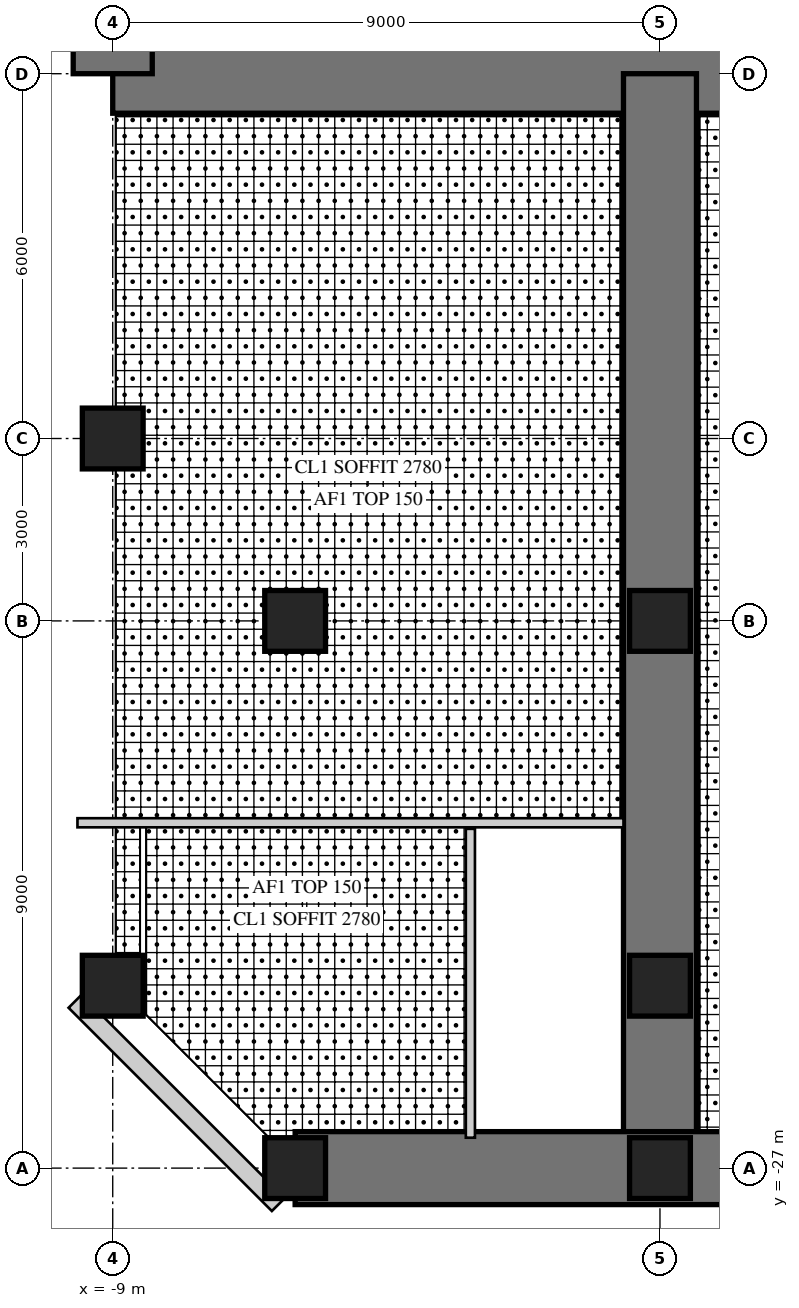
"""IFC4 building model, lengths in metres.
Left out: names, types, materials, properties, quantities, classifications, styles, units other than length and angle.
Written with IfcOpenShell. Run it as: python <this file> out.ifc"""

import sys

from ifc_helpers import new_model, si_unit, direction, frame, frame_2d, origin, origin_2d, place, context, subcontext, project, spatial, rectangle, hollow_rectangle, extrude, element, fill, save


model = new_model("IFC4")
c1 = context("Model", 3, precision=1e-05, world=origin(), true_north=direction((0.0, 1.0)))
c2 = subcontext(c1, "Body", "Model", "MODEL_VIEW")
j1 = project(units=[si_unit("LENGTHUNIT", "METRE"), si_unit("PLANEANGLEUNIT", "RADIAN")], contexts=[c1])
p1 = place(None, origin())
s1 = spatial("IfcSite", under=j1, at=p1, CompositionType="ELEMENT")
p2 = place(p1, origin())
s2 = spatial("IfcBuilding", under=s1, at=p2, CompositionType="ELEMENT")
p3 = place(p2, frame((0.0, 0.0, 104.5)))
s3 = spatial("IfcBuildingStorey", under=s2, at=p3, CompositionType="ELEMENT", Elevation=104.5)
p4 = place(p3, frame((-9.0, -9.0, 0.0), z_axis=(0.0, 0.0, 1.0), x_axis=(1.0, 0.0, 0.0)))
e1 = element("IfcWall", 1, at=p4, inside=s3, PredefinedType="SHEAR", context=c2, shape_type="SweptSolid", body=[
    extrude(rectangle(XDim=18.0, YDim=1.3, at=frame_2d((9.0, 0.0))), origin(), (0.0, 0.0, 1.0), 4.0),
])
p5 = place(p4, frame((9.8, 0.0, 0.0)))
e2 = element("IfcOpeningElement", 2, at=p5, cuts=e1, PredefinedType="OPENING", context=c2, shape_type="SweptSolid", body=[
    extrude(rectangle(XDim=1.0, YDim=2.4, at=frame_2d((0.5, 1.2))), frame((0.0, 0.66, 0.0), z_axis=(0.0, -1.0, 0.0), x_axis=(1.0, 0.0, 0.0)), (0.0, 0.0, 1.0), 1.32),
])
p6 = place(p3, frame((-9.0, 9.0, 0.0), z_axis=(0.0, 0.0, 1.0), x_axis=(0.0, -1.0, 0.0)))
e3 = element("IfcWall", 3, at=p6, inside=s3, PredefinedType="SHEAR", context=c2, shape_type="SweptSolid", body=[
    extrude(rectangle(XDim=18.0, YDim=1.3, at=frame_2d((9.0, 0.0))), origin(), (0.0, 0.0, 1.0), 4.0),
])
p7 = place(p6, frame((9.8, 0.0, 0.0)))
e4 = element("IfcOpeningElement", 4, at=p7, cuts=e3, PredefinedType="OPENING", context=c2, shape_type="SweptSolid", body=[
    extrude(rectangle(XDim=1.0, YDim=2.4, at=frame_2d((0.5, 1.2))), frame((0.0, 0.66, 0.0), z_axis=(0.0, -1.0, 0.0), x_axis=(1.0, 0.0, 0.0)), (0.0, 0.0, 1.0), 1.32),
])
p8 = place(p3, frame((0.0, -9.0, 0.0), z_axis=(0.0, 0.0, 1.0), x_axis=(0.0, -1.0, 0.0)))
e5 = element("IfcWall", 5, at=p8, inside=s3, PredefinedType="SHEAR", context=c2, shape_type="SweptSolid", body=[
    extrude(rectangle(XDim=18.0, YDim=1.2, at=frame_2d((9.0, 0.0))), origin(), (0.0, 0.0, 1.0), 4.0),
])
p9 = place(p8, frame((9.8, 0.0, 0.0)))
e6 = element("IfcOpeningElement", 6, at=p9, cuts=e5, PredefinedType="OPENING", context=c2, shape_type="SweptSolid", body=[
    extrude(rectangle(XDim=1.0, YDim=2.2, at=frame_2d((0.5, 1.1))), frame((0.0, 0.61, 0.0), z_axis=(0.0, -1.0, 0.0), x_axis=(1.0, 0.0, 0.0)), (0.0, 0.0, 1.0), 1.22),
])
p10 = place(p3, frame((-6.0, -27.0, 0.0), z_axis=(0.0, 0.0, 1.0), x_axis=(1.0, 0.0, 0.0)))
e7 = element("IfcWall", 7, at=p10, inside=s3, PredefinedType="SHEAR", context=c2, shape_type="SweptSolid", body=[
    extrude(rectangle(XDim=12.0, YDim=1.2, at=frame_2d((6.0, 0.0))), origin(), (0.0, 0.0, 1.0), 4.0),
])
p11 = place(p10, frame((1.55, 0.0, 0.6)))
e8 = element("IfcOpeningElement", 8, at=p11, cuts=e7, PredefinedType="OPENING", context=c2, shape_type="SweptSolid", body=[
    extrude(rectangle(XDim=3.0, YDim=2.4, at=frame_2d((1.5, 1.2))), frame((0.0, 0.61, 0.0), z_axis=(0.0, -1.0, 0.0), x_axis=(1.0, 0.0, 0.0)), (0.0, 0.0, 1.0), 1.22),
])
p12 = place(p10, frame((7.45, 0.0, 0.6)))
e9 = element("IfcOpeningElement", 9, at=p12, cuts=e7, PredefinedType="OPENING", context=c2, shape_type="SweptSolid", body=[
    extrude(rectangle(XDim=3.0, YDim=2.4, at=frame_2d((1.5, 1.2))), frame((0.0, 0.61, 0.0), z_axis=(0.0, -1.0, 0.0), x_axis=(1.0, 0.0, 0.0)), (0.0, 0.0, 1.0), 1.22),
])
for number, where, z_axis, x_axis in (
    (10, (-9.0, -15.0, 0.0), (0.0, 0.0, 1.0), (1.0, 0.0, 0.0)),
    (11, (-9.0, -24.0, 0.0), (0.0, 0.0, 1.0), (1.0, 0.0, 0.0)),
    (12, (-6.0, -27.0, 0.0), (0.0, 0.0, 1.0), (1.0, 0.0, 0.0)),
    (13, (0.0, -27.0, 0.0), (0.0, 0.0, 1.0), (1.0, 0.0, 0.0)),
    (14, (-6.0, -18.0, 0.0), (0.0, 0.0, 1.0), (1.0, 0.0, 0.0)),
    (15, (0.0, -18.0, 0.0), (0.0, 0.0, 1.0), (1.0, 0.0, 0.0)),
    (16, (0.0, -24.0, 0.0), (0.0, 0.0, 1.0), (1.0, 0.0, 0.0)),
):
    element("IfcColumn", number, at=place(p3, frame(where, z_axis=z_axis, x_axis=x_axis)), inside=s3, PredefinedType="COLUMN", context=c2, shape_type="SweptSolid", body=[
        extrude(rectangle(XDim=1.0, YDim=1.0, at=origin_2d()), origin(), (0.0, 0.0, 1.0), 4.0),
    ])
p13 = place(p3, frame((-9.62, -24.257, 0.0), z_axis=(0.0, 0.0, 1.0), x_axis=(0.707106781187, -0.707106781187, 0.0)))
e17 = element("IfcWall", 17, at=p13, inside=s3, PredefinedType="SOLIDWALL", context=c2, shape_type="SweptSolid", body=[
    extrude(rectangle(XDim=4.728, YDim=0.3, at=frame_2d((2.364, 0.0))), origin(), (0.0, 0.0, 1.0), 3.8),
])
p14 = place(p13, frame((1.914, 0.0, 0.3)))
e18 = element("IfcOpeningElement", 18, at=p14, cuts=e17, PredefinedType="OPENING", context=c2, shape_type="SweptSolid", body=[
    extrude(rectangle(XDim=0.9, YDim=2.4, at=frame_2d((0.45, 1.2))), frame((0.0, 0.16, 0.0), z_axis=(0.0, -1.0, 0.0), x_axis=(1.0, 0.0, 0.0)), (0.0, 0.0, 1.0), 0.32),
])
p15 = place(p3, frame((-3.118, -21.42, 0.0), z_axis=(0.0, 0.0, 1.0), x_axis=(0.0, -1.0, 0.0)))
e19 = element("IfcWall", 19, at=p15, inside=s3, PredefinedType="PARTITIONING", context=c2, shape_type="SweptSolid", body=[
    extrude(rectangle(XDim=5.08, YDim=0.15, at=frame_2d((2.54, 0.0))), origin(), (0.0, 0.0, 1.0), 3.8),
])
p16 = place(p3, frame((-9.58, -21.32, 0.0), z_axis=(0.0, 0.0, 1.0), x_axis=(1.0, 0.0, 0.0)))
e20 = element("IfcWall", 20, at=p16, inside=s3, PredefinedType="PARTITIONING", context=c2, shape_type="SweptSolid", body=[
    extrude(rectangle(XDim=8.98, YDim=0.15, at=frame_2d((4.49, 0.0))), origin(), (0.0, 0.0, 1.0), 3.8),
])
p17 = place(p16, frame((4.987, 0.0, 0.0)))
e21 = element("IfcOpeningElement", 21, at=p17, cuts=e20, PredefinedType="OPENING", context=c2, shape_type="SweptSolid", body=[
    extrude(rectangle(XDim=1.0, YDim=2.2, at=frame_2d((0.5, 1.1))), frame((0.0, 0.085, 0.0), z_axis=(0.0, -1.0, 0.0), x_axis=(1.0, 0.0, 0.0)), (0.0, 0.0, 1.0), 0.17),
])
p18 = place(p16, frame((7.63, 0.0, 0.0)))
e22 = element("IfcOpeningElement", 22, at=p18, cuts=e20, PredefinedType="OPENING", context=c2, shape_type="SweptSolid", body=[
    extrude(rectangle(XDim=1.0, YDim=2.2, at=frame_2d((0.5, 1.1))), frame((0.0, 0.085, 0.0), z_axis=(0.0, -1.0, 0.0), x_axis=(1.0, 0.0, 0.0)), (0.0, 0.0, 1.0), 0.17),
])
p19 = place(p14, origin())
e23 = element("IfcWindow", 23, at=p19, inside=s3, PartitioningType="SINGLE_PANEL", PredefinedType="WINDOW", context=c2, shape_type="SweptSolid", body=[
    extrude(hollow_rectangle(XDim=0.9, YDim=2.4, WallThickness=0.06, at=frame_2d((0.45, 1.2))), frame((0.0, 0.03, 0.0), z_axis=(0.0, -1.0, 0.0), x_axis=(1.0, 0.0, 0.0)), (0.0, 0.0, 1.0), 0.06),
    extrude(rectangle(XDim=0.779, YDim=2.279, at=frame_2d((0.45, 1.2))), frame((0.0, 0.03, 0.0), z_axis=(0.0, -1.0, 0.0), x_axis=(1.0, 0.0, 0.0)), (0.0, 0.0, 1.0), 0.06),
])
fill(e18, e23)
p20 = place(p11, origin())
e24 = element("IfcWindow", 24, at=p20, inside=s3, PartitioningType="SINGLE_PANEL", PredefinedType="WINDOW", context=c2, shape_type="SweptSolid", body=[
    extrude(hollow_rectangle(XDim=3.0, YDim=2.4, WallThickness=0.06, at=frame_2d((1.5, 1.2))), frame((0.0, 0.03, 0.0), z_axis=(0.0, -1.0, 0.0), x_axis=(1.0, 0.0, 0.0)), (0.0, 0.0, 1.0), 0.06),
    extrude(rectangle(XDim=2.879, YDim=2.279, at=frame_2d((1.5, 1.2))), frame((0.0, 0.03, 0.0), z_axis=(0.0, -1.0, 0.0), x_axis=(1.0, 0.0, 0.0)), (0.0, 0.0, 1.0), 0.06),
])
fill(e8, e24)
p21 = place(p17, frame((1.0, 0.0, 0.0), z_axis=(0.0, 0.0, 1.0), x_axis=(-1.0, 0.0, 0.0)))
e25 = element("IfcDoor", 25, at=p21, inside=s3, OperationType="SINGLE_SWING_LEFT", PredefinedType="DOOR", context=c2, shape_type="SweptSolid", body=[
    extrude(rectangle(XDim=1.0, YDim=2.2, at=frame_2d((0.5, 1.1))), frame((0.0, 0.025, 0.0), z_axis=(0.0, -1.0, 0.0), x_axis=(1.0, 0.0, 0.0)), (0.0, 0.0, 1.0), 0.05),
])
fill(e21, e25)
p22 = place(p18, frame((1.0, 0.0, 0.0), z_axis=(0.0, 0.0, 1.0), x_axis=(-1.0, 0.0, 0.0)))
e26 = element("IfcDoor", 26, at=p22, inside=s3, OperationType="SINGLE_SWING_LEFT", PredefinedType="DOOR", context=c2, shape_type="SweptSolid", body=[
    extrude(rectangle(XDim=1.0, YDim=2.2, at=frame_2d((0.5, 1.1))), frame((0.0, 0.025, 0.0), z_axis=(0.0, -1.0, 0.0), x_axis=(1.0, 0.0, 0.0)), (0.0, 0.0, 1.0), 0.05),
])
fill(e22, e26)
p23 = place(p9, frame((1.0, 0.0, 0.0), z_axis=(0.0, 0.0, 1.0), x_axis=(-1.0, 0.0, 0.0)))
e27 = element("IfcDoor", 27, at=p23, inside=s3, OperationType="SINGLE_SWING_LEFT", PredefinedType="DOOR", context=c2, shape_type="SweptSolid", body=[
    extrude(rectangle(XDim=1.0, YDim=2.2, at=frame_2d((0.5, 1.1))), frame((0.0, 0.025, 0.0), z_axis=(0.0, -1.0, 0.0), x_axis=(1.0, 0.0, 0.0)), (0.0, 0.0, 1.0), 0.05),
])
fill(e6, e27)
p24 = place(p5, frame((1.0, 0.0, 0.0), z_axis=(0.0, 0.0, 1.0), x_axis=(-1.0, 0.0, 0.0)))
e28 = element("IfcDoor", 28, at=p24, inside=s3, OperationType="SINGLE_SWING_RIGHT", PredefinedType="DOOR", context=c2, shape_type="SweptSolid", body=[
    extrude(rectangle(XDim=1.0, YDim=2.4, at=frame_2d((0.5, 1.2))), frame((0.0, -0.005, 0.0), z_axis=(0.0, -1.0, 0.0), x_axis=(1.0, 0.0, 0.0)), (0.0, 0.0, 1.0), 0.05),
])
fill(e2, e28)
save(model, sys.argv[1])
